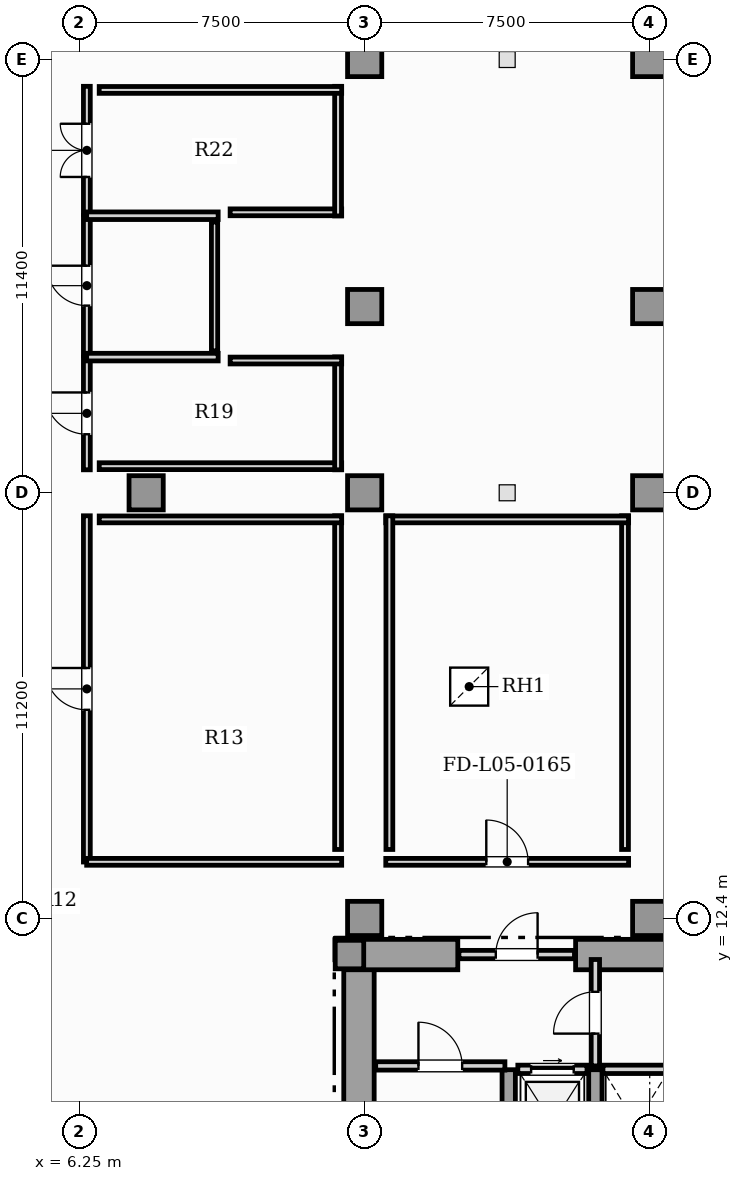
"""IFC4 building model, lengths in metres.
Left out: names, types, materials, properties, quantities, classifications, styles, units other than length and angle.
Written with IfcOpenShell. Run it as: python <this file> out.ifc"""

import sys

from ifc_helpers import new_model, si_unit, direction, frame, frame_2d, origin, origin_2d, place, context, subcontext, project, spatial, rectangle, extrude, element, fill, save


model = new_model("IFC4")
c1 = context("Model", 3, precision=1e-05, world=origin(), true_north=direction((0.0, 1.0)))
c2 = subcontext(c1, "Body", "Model", "MODEL_VIEW")
j1 = project(units=[si_unit("LENGTHUNIT", "METRE"), si_unit("PLANEANGLEUNIT", "RADIAN")], contexts=[c1])
p1 = place(None, origin())
s1 = spatial("IfcSite", under=j1, at=p1, CompositionType="ELEMENT")
p2 = place(p1, origin())
s2 = spatial("IfcBuilding", under=s1, at=p2, CompositionType="ELEMENT")
p3 = place(p2, frame((0.0, 0.0, 24.6)))
s3 = spatial("IfcBuildingStorey", under=s2, at=p3, CompositionType="ELEMENT", Elevation=24.6)
p4 = place(p3, frame((13.6, 0.92, 0.0), z_axis=(0.0, 0.0, 1.0), x_axis=(0.0, 1.0, 0.0)))
e1 = element("IfcWall", 1, at=p4, inside=s3, PredefinedType="SHEAR", context=c2, shape_type="SweptSolid", body=[
    extrude(rectangle(XDim=10.53, YDim=0.8, at=frame_2d((5.265, 0.0))), origin(), (0.0, 0.0, 1.0), 4.95),
])
p5 = place(p3, frame((13.25, 11.45, 0.0), z_axis=(0.0, 0.0, 1.0), x_axis=(1.0, 0.0, 0.0)))
e2 = element("IfcWall", 2, at=p5, inside=s3, PredefinedType="SHEAR", context=c2, shape_type="SweptSolid", body=[
    extrude(rectangle(XDim=2.95, YDim=0.8, at=frame_2d((1.475, 0.0))), origin(), (0.0, 0.0, 1.0), 4.95),
])
p6 = place(p3, frame((19.3, 11.45, 0.0), z_axis=(0.0, 0.0, 1.0), x_axis=(1.0, 0.0, 0.0)))
e3 = element("IfcWall", 3, at=p6, inside=s3, PredefinedType="SHEAR", context=c2, shape_type="SweptSolid", body=[
    extrude(rectangle(XDim=7.3, YDim=0.8, at=frame_2d((3.65, 0.0))), origin(), (0.0, 0.0, 1.0), 4.95),
])
for number, where, z_axis, x_axis in (
    (4, (17.54, 0.92, 0.0), (0.0, 0.0, 1.0), (0.0, 1.0, 0.0)),
    (5, (19.82, 0.92, 0.0), (0.0, 0.0, 1.0), (0.0, 1.0, 0.0)),
):
    element("IfcWall", number, at=place(p3, frame(where, z_axis=z_axis, x_axis=x_axis)), inside=s3, PredefinedType="SHEAR", context=c2, shape_type="SweptSolid", body=[
        extrude(rectangle(XDim=7.5, YDim=0.35, at=frame_2d((3.75, 0.0))), origin(), (0.0, 0.0, 1.0), 4.95),
    ])
p7 = place(p3, frame((13.35, 11.45, 0.0), z_axis=(0.0, 0.0, 1.0), x_axis=(1.0, 0.0, 0.0)))
e6 = element("IfcColumn", 6, at=p7, inside=s3, PredefinedType="COLUMN", context=c2, shape_type="SweptSolid", body=[
    extrude(rectangle(XDim=0.75, YDim=0.75, at=origin_2d()), origin(), (0.0, 0.0, 1.0), 5.2),
])
for number, where, z_axis, x_axis in (
    (7, (13.75, 12.4, 0.0), (0.0, 0.0, 1.0), (1.0, 0.0, 0.0)),
    (8, (13.75, 23.6, 0.0), (0.0, 0.0, 1.0), (1.0, 0.0, 0.0)),
    (9, (13.75, 35.0, 0.0), (0.0, 0.0, 1.0), (1.0, 0.0, 0.0)),
    (10, (21.25, 12.4, 0.0), (0.0, 0.0, 1.0), (1.0, 0.0, 0.0)),
    (11, (8.0, 23.6, 0.0), (0.0, 0.0, 1.0), (1.0, 0.0, 0.0)),
    (12, (21.25, 23.6, 0.0), (0.0, 0.0, 1.0), (1.0, 0.0, 0.0)),
    (13, (13.75, 28.5, 0.0), (0.0, 0.0, 1.0), (1.0, 0.0, 0.0)),
    (14, (21.25, 28.5, 0.0), (0.0, 0.0, 1.0), (1.0, 0.0, 0.0)),
    (15, (21.25, 35.0, 0.0), (0.0, 0.0, 1.0), (1.0, 0.0, 0.0)),
):
    element("IfcColumn", number, at=place(p3, frame(where, z_axis=z_axis, x_axis=x_axis)), inside=s3, PredefinedType="COLUMN", context=c2, shape_type="SweptSolid", body=[
        extrude(rectangle(XDim=0.9, YDim=0.9, at=origin_2d()), origin(), (0.0, 0.0, 1.0), 5.2),
    ])
p8 = place(p3, frame((17.78, 8.43, 0.0), z_axis=(0.0, 0.0, 1.0), x_axis=(1.0, 0.0, 0.0)))
e16 = element("IfcWall", 16, at=p8, inside=s3, PredefinedType="SOLIDWALL", context=c2, shape_type="SweptSolid", body=[
    extrude(rectangle(XDim=1.82, YDim=0.22, at=frame_2d((0.91, 0.0))), origin(), (0.0, 0.0, 1.0), 4.95),
])
p9 = place(p8, frame((0.35, 0.0, 0.0)))
e17 = element("IfcOpeningElement", 17, at=p9, cuts=e16, PredefinedType="OPENING", context=c2, shape_type="SweptSolid", body=[
    extrude(rectangle(XDim=1.12, YDim=2.25, at=frame_2d((0.56, 1.125))), frame((0.0, 0.12, 0.0), z_axis=(0.0, -1.0, 0.0), x_axis=(1.0, 0.0, 0.0)), (0.0, 0.0, 1.0), 0.24),
])
p10 = place(p3, frame((20.02, 8.43, 0.0), z_axis=(0.0, 0.0, 1.0), x_axis=(1.0, 0.0, 0.0)))
e18 = element("IfcWall", 18, at=p10, inside=s3, PredefinedType="SOLIDWALL", context=c2, shape_type="SweptSolid", body=[
    extrude(rectangle(XDim=1.74, YDim=0.22, at=frame_2d((0.87, 0.0))), origin(), (0.0, 0.0, 1.0), 4.95),
])
p11 = place(p3, frame((14.04, 8.52, 0.0), z_axis=(0.0, 0.0, 1.0), x_axis=(1.0, 0.0, 0.0)))
e19 = element("IfcWall", 19, at=p11, inside=s3, PredefinedType="SOLIDWALL", context=c2, shape_type="SweptSolid", body=[
    extrude(rectangle(XDim=3.4, YDim=0.22, at=frame_2d((1.7, 0.0))), origin(), (0.0, 0.0, 1.0), 4.95),
])
p12 = place(p11, frame((1.125, 0.0, 0.0)))
e20 = element("IfcOpeningElement", 20, at=p12, cuts=e19, PredefinedType="OPENING", context=c2, shape_type="SweptSolid", body=[
    extrude(rectangle(XDim=1.15, YDim=2.2, at=frame_2d((0.575, 1.1))), frame((0.0, 0.12, 0.0), z_axis=(0.0, -1.0, 0.0), x_axis=(1.0, 0.0, 0.0)), (0.0, 0.0, 1.0), 0.24),
])
p13 = place(p3, frame((19.82, 8.52, 0.0), z_axis=(0.0, 0.0, 1.0), x_axis=(0.0, 1.0, 0.0)))
e21 = element("IfcWall", 21, at=p13, inside=s3, PredefinedType="SOLIDWALL", context=c2, shape_type="SweptSolid", body=[
    extrude(rectangle(XDim=2.8, YDim=0.22, at=frame_2d((1.4, 0.0))), origin(), (0.0, 0.0, 1.0), 4.406),
])
p14 = place(p13, frame((0.85, 0.0, 0.0)))
e22 = element("IfcOpeningElement", 22, at=p14, cuts=e21, PredefinedType="OPENING", context=c2, shape_type="SweptSolid", body=[
    extrude(rectangle(XDim=1.1, YDim=2.2, at=frame_2d((0.55, 1.1))), frame((0.0, 0.12, 0.0), z_axis=(0.0, -1.0, 0.0), x_axis=(1.0, 0.0, 0.0)), (0.0, 0.0, 1.0), 0.24),
])
p15 = place(p3, frame((16.23, 11.45, 0.0), z_axis=(0.0, 0.0, 1.0), x_axis=(1.0, 0.0, 0.0)))
e23 = element("IfcWall", 23, at=p15, inside=s3, PredefinedType="SOLIDWALL", context=c2, shape_type="SweptSolid", body=[
    extrude(rectangle(XDim=3.04, YDim=0.22, at=frame_2d((1.52, 0.0))), origin(), (0.0, 0.0, 1.0), 4.95),
])
p16 = place(p15, frame((0.97, 0.0, 0.0)))
e24 = element("IfcOpeningElement", 24, at=p16, cuts=e23, PredefinedType="OPENING", context=c2, shape_type="SweptSolid", body=[
    extrude(rectangle(XDim=1.1, YDim=2.2, at=frame_2d((0.55, 1.1))), frame((0.0, 0.12, 0.0), z_axis=(0.0, -1.0, 0.0), x_axis=(1.0, 0.0, 0.0)), (0.0, 0.0, 1.0), 0.24),
])
p17 = place(p3, frame((6.44, 13.885, 0.0), z_axis=(0.0, 0.0, 1.0), x_axis=(0.0, 1.0, 0.0)))
e25 = element("IfcWall", 25, at=p17, inside=s3, PredefinedType="PARTITIONING", context=c2, shape_type="SweptSolid", body=[
    extrude(rectangle(XDim=9.11, YDim=0.18, at=frame_2d((4.555, 0.0))), origin(), (0.0, 0.0, 1.0), 4.95),
])
p18 = place(p17, frame((4.005, 0.0, 0.0)))
e26 = element("IfcOpeningElement", 26, at=p18, cuts=e25, PredefinedType="OPENING", context=c2, shape_type="SweptSolid", body=[
    extrude(rectangle(XDim=1.1, YDim=2.2, at=frame_2d((0.55, 1.1))), frame((0.0, 0.1, 0.0), z_axis=(0.0, -1.0, 0.0), x_axis=(1.0, 0.0, 0.0)), (0.0, 0.0, 1.0), 0.2),
])
p19 = place(p3, frame((6.435, 13.89, 0.0), z_axis=(0.0, 0.0, 1.0), x_axis=(1.0, 0.0, 0.0)))
e27 = element("IfcWall", 27, at=p19, inside=s3, PredefinedType="PARTITIONING", context=c2, shape_type="SweptSolid", body=[
    extrude(rectangle(XDim=6.71, YDim=0.18, at=frame_2d((3.355, 0.0))), origin(), (0.0, 0.0, 1.0), 4.95),
])
p20 = place(p3, frame((14.305, 13.89, 0.0), z_axis=(0.0, 0.0, 1.0), x_axis=(1.0, 0.0, 0.0)))
e28 = element("IfcWall", 28, at=p20, inside=s3, PredefinedType="PARTITIONING", context=c2, shape_type="SweptSolid", body=[
    extrude(rectangle(XDim=6.39, YDim=0.18, at=frame_2d((3.195, 0.0))), origin(), (0.0, 0.0, 1.0), 4.95),
])
p21 = place(p20, frame((2.645, 0.0, 0.0)))
e29 = element("IfcOpeningElement", 29, at=p21, cuts=e28, PredefinedType="OPENING", context=c2, shape_type="SweptSolid", body=[
    extrude(rectangle(XDim=1.1, YDim=2.2, at=frame_2d((0.55, 1.1))), frame((0.0, 0.1, 0.0), z_axis=(0.0, -1.0, 0.0), x_axis=(1.0, 0.0, 0.0)), (0.0, 0.0, 1.0), 0.2),
])
p22 = place(p3, frame((6.44, 24.205, 0.0), z_axis=(0.0, 0.0, 1.0), x_axis=(0.0, 1.0, 0.0)))
e30 = element("IfcWall", 30, at=p22, inside=s3, PredefinedType="PARTITIONING", context=c2, shape_type="SweptSolid", body=[
    extrude(rectangle(XDim=2.97, YDim=0.18, at=frame_2d((1.485, 0.0))), origin(), (0.0, 0.0, 1.0), 4.95),
])
p23 = place(p22, frame((0.935, 0.0, 0.0)))
e31 = element("IfcOpeningElement", 31, at=p23, cuts=e30, PredefinedType="OPENING", context=c2, shape_type="SweptSolid", body=[
    extrude(rectangle(XDim=1.1, YDim=2.2, at=frame_2d((0.55, 1.1))), frame((0.0, 0.1, 0.0), z_axis=(0.0, -1.0, 0.0), x_axis=(1.0, 0.0, 0.0)), (0.0, 0.0, 1.0), 0.2),
])
p24 = place(p3, frame((6.44, 27.205, 0.0), z_axis=(0.0, 0.0, 1.0), x_axis=(0.0, 1.0, 0.0)))
e32 = element("IfcWall", 32, at=p24, inside=s3, PredefinedType="PARTITIONING", context=c2, shape_type="SweptSolid", body=[
    extrude(rectangle(XDim=3.69, YDim=0.18, at=frame_2d((1.845, 0.0))), origin(), (0.0, 0.0, 1.0), 4.95),
])
p25 = place(p24, frame((1.32, 0.0, 0.0)))
e33 = element("IfcOpeningElement", 33, at=p25, cuts=e32, PredefinedType="OPENING", context=c2, shape_type="SweptSolid", body=[
    extrude(rectangle(XDim=1.05, YDim=2.15, at=frame_2d((0.525, 1.075))), frame((0.0, 0.1, 0.0), z_axis=(0.0, -1.0, 0.0), x_axis=(1.0, 0.0, 0.0)), (0.0, 0.0, 1.0), 0.2),
])
p26 = place(p3, frame((6.44, 30.925, 0.0), z_axis=(0.0, 0.0, 1.0), x_axis=(0.0, 1.0, 0.0)))
e34 = element("IfcWall", 34, at=p26, inside=s3, PredefinedType="PARTITIONING", context=c2, shape_type="SweptSolid", body=[
    extrude(rectangle(XDim=3.37, YDim=0.18, at=frame_2d((1.685, 0.0))), origin(), (0.0, 0.0, 1.0), 4.95),
])
p27 = place(p26, frame((0.985, 0.0, 0.0)))
e35 = element("IfcOpeningElement", 35, at=p27, cuts=e34, PredefinedType="OPENING", context=c2, shape_type="SweptSolid", body=[
    extrude(rectangle(XDim=1.4, YDim=2.2, at=frame_2d((0.7, 1.1))), frame((0.0, 0.1, 0.0), z_axis=(0.0, -1.0, 0.0), x_axis=(1.0, 0.0, 0.0)), (0.0, 0.0, 1.0), 0.2),
])
for number, where, z_axis, x_axis in (
    (36, (6.435, 27.17, 0.0), (0.0, 0.0, 1.0), (1.0, 0.0, 0.0)),
    (37, (6.435, 30.89, 0.0), (0.0, 0.0, 1.0), (1.0, 0.0, 0.0)),
):
    element("IfcWall", number, at=place(p3, frame(where, z_axis=z_axis, x_axis=x_axis)), inside=s3, PredefinedType="PARTITIONING", context=c2, shape_type="SweptSolid", body=[
        extrude(rectangle(XDim=3.46, YDim=0.2, at=frame_2d((1.73, 0.0))), origin(), (0.0, 0.0, 1.0), 4.95),
    ])
p28 = place(p3, frame((13.05, 14.215, 0.0), z_axis=(0.0, 0.0, 1.0), x_axis=(0.0, 1.0, 0.0)))
e38 = element("IfcWall", 38, at=p28, inside=s3, PredefinedType="PARTITIONING", context=c2, shape_type="SweptSolid", body=[
    extrude(rectangle(XDim=8.78, YDim=0.18, at=frame_2d((4.39, 0.0))), origin(), (0.0, 0.0, 1.0), 4.95),
])
p29 = place(p3, frame((13.145, 22.9, 0.0), z_axis=(0.0, 0.0, 1.0), x_axis=(-1.0, 0.0, 0.0)))
e39 = element("IfcWall", 39, at=p29, inside=s3, PredefinedType="PARTITIONING", context=c2, shape_type="SweptSolid", body=[
    extrude(rectangle(XDim=6.38, YDim=0.18, at=frame_2d((3.19, 0.0))), origin(), (0.0, 0.0, 1.0), 4.95),
])
p30 = place(p3, frame((20.6, 14.215, 0.0), z_axis=(0.0, 0.0, 1.0), x_axis=(0.0, 1.0, 0.0)))
e40 = element("IfcWall", 40, at=p30, inside=s3, PredefinedType="PARTITIONING", context=c2, shape_type="SweptSolid", body=[
    extrude(rectangle(XDim=8.78, YDim=0.18, at=frame_2d((4.39, 0.0))), origin(), (0.0, 0.0, 1.0), 4.95),
])
p31 = place(p3, frame((20.695, 22.9, 0.0), z_axis=(0.0, 0.0, 1.0), x_axis=(-1.0, 0.0, 0.0)))
e41 = element("IfcWall", 41, at=p31, inside=s3, PredefinedType="PARTITIONING", context=c2, shape_type="SweptSolid", body=[
    extrude(rectangle(XDim=6.39, YDim=0.18, at=frame_2d((3.195, 0.0))), origin(), (0.0, 0.0, 1.0), 4.95),
])
p32 = place(p3, frame((14.4, 22.995, 0.0), z_axis=(0.0, 0.0, 1.0), x_axis=(0.0, -1.0, 0.0)))
e42 = element("IfcWall", 42, at=p32, inside=s3, PredefinedType="PARTITIONING", context=c2, shape_type="SweptSolid", body=[
    extrude(rectangle(XDim=8.78, YDim=0.18, at=frame_2d((4.39, 0.0))), origin(), (0.0, 0.0, 1.0), 4.95),
])
p33 = place(p3, frame((6.765, 24.3, 0.0), z_axis=(0.0, 0.0, 1.0), x_axis=(1.0, 0.0, 0.0)))
e43 = element("IfcWall", 43, at=p33, inside=s3, PredefinedType="PARTITIONING", context=c2, shape_type="SweptSolid", body=[
    extrude(rectangle(XDim=6.38, YDim=0.18, at=frame_2d((3.19, 0.0))), origin(), (0.0, 0.0, 1.0), 4.95),
])
p34 = place(p3, frame((13.05, 24.205, 0.0), z_axis=(0.0, 0.0, 1.0), x_axis=(0.0, 1.0, 0.0)))
e44 = element("IfcWall", 44, at=p34, inside=s3, PredefinedType="PARTITIONING", context=c2, shape_type="SweptSolid", body=[
    extrude(rectangle(XDim=2.97, YDim=0.18, at=frame_2d((1.485, 0.0))), origin(), (0.0, 0.0, 1.0), 4.95),
])
p35 = place(p3, frame((13.145, 27.08, 0.0), z_axis=(0.0, 0.0, 1.0), x_axis=(-1.0, 0.0, 0.0)))
e45 = element("IfcWall", 45, at=p35, inside=s3, PredefinedType="PARTITIONING", context=c2, shape_type="SweptSolid", body=[
    extrude(rectangle(XDim=2.935, YDim=0.18, at=frame_2d((1.468, 0.0))), origin(), (0.0, 0.0, 1.0), 4.95),
])
p36 = place(p3, frame((9.8, 27.335, 0.0), z_axis=(0.0, 0.0, 1.0), x_axis=(0.0, 1.0, 0.0)))
e46 = element("IfcWall", 46, at=p36, inside=s3, PredefinedType="PLUMBINGWALL", context=c2, shape_type="SweptSolid", body=[
    extrude(rectangle(XDim=3.39, YDim=0.165, at=frame_2d((1.695, 0.0))), origin(), (0.0, 0.0, 1.0), 4.95),
])
p37 = place(p3, frame((10.21, 30.98, 0.0), z_axis=(0.0, 0.0, 1.0), x_axis=(1.0, 0.0, 0.0)))
e47 = element("IfcWall", 47, at=p37, inside=s3, PredefinedType="PARTITIONING", context=c2, shape_type="SweptSolid", body=[
    extrude(rectangle(XDim=2.935, YDim=0.18, at=frame_2d((1.468, 0.0))), origin(), (0.0, 0.0, 1.0), 4.95),
])
p38 = place(p3, frame((13.05, 30.885, 0.0), z_axis=(0.0, 0.0, 1.0), x_axis=(0.0, 1.0, 0.0)))
e48 = element("IfcWall", 48, at=p38, inside=s3, PredefinedType="PARTITIONING", context=c2, shape_type="SweptSolid", body=[
    extrude(rectangle(XDim=3.41, YDim=0.18, at=frame_2d((1.705, 0.0))), origin(), (0.0, 0.0, 1.0), 4.95),
])
p39 = place(p3, frame((13.145, 34.2, 0.0), z_axis=(0.0, 0.0, 1.0), x_axis=(-1.0, 0.0, 0.0)))
e49 = element("IfcWall", 49, at=p39, inside=s3, PredefinedType="PARTITIONING", context=c2, shape_type="SweptSolid", body=[
    extrude(rectangle(XDim=6.38, YDim=0.18, at=frame_2d((3.19, 0.0))), origin(), (0.0, 0.0, 1.0), 4.95),
])
p40 = place(p3, frame((0.0, 0.0, -0.4)))
p41 = place(p40, frame((16.5, 18.5, 0.35)))
e50 = element("IfcDoor", 50, at=p41, inside=s3, OperationType="SINGLE_SWING_LEFT", PredefinedType="TRAPDOOR", context=c2, shape_type="SweptSolid", body=[
    extrude(rectangle(XDim=1.0, YDim=1.0, at=origin_2d()), origin(), (0.0, 0.0, 1.0), 0.05),
])
p42 = place(p9, origin())
e51 = element("IfcDoor", 51, at=p42, inside=s3, OperationType="SLIDING_TO_RIGHT", PredefinedType="DOOR", context=c2, shape_type="SweptSolid", body=[
    extrude(rectangle(XDim=1.12, YDim=2.25, at=frame_2d((0.56, 1.125))), frame((0.0, 0.025, 0.0), z_axis=(0.0, -1.0, 0.0), x_axis=(1.0, 0.0, 0.0)), (0.0, 0.0, 1.0), 0.05),
])
fill(e17, e51)
p43 = place(p12, origin())
e52 = element("IfcDoor", 52, at=p43, inside=s3, OperationType="SINGLE_SWING_LEFT", PredefinedType="DOOR", context=c2, shape_type="SweptSolid", body=[
    extrude(rectangle(XDim=1.15, YDim=2.2, at=frame_2d((0.575, 1.1))), frame((0.0, 0.025, 0.0), z_axis=(0.0, -1.0, 0.0), x_axis=(1.0, 0.0, 0.0)), (0.0, 0.0, 1.0), 0.05),
])
fill(e20, e52)
p44 = place(p14, origin())
e53 = element("IfcDoor", 53, at=p44, inside=s3, OperationType="SINGLE_SWING_LEFT", PredefinedType="DOOR", context=c2, shape_type="SweptSolid", body=[
    extrude(rectangle(XDim=1.1, YDim=2.2, at=frame_2d((0.55, 1.1))), frame((0.0, 0.025, 0.0), z_axis=(0.0, -1.0, 0.0), x_axis=(1.0, 0.0, 0.0)), (0.0, 0.0, 1.0), 0.05),
])
fill(e22, e53)
p45 = place(p16, origin())
e54 = element("IfcDoor", 54, at=p45, inside=s3, OperationType="SINGLE_SWING_RIGHT", PredefinedType="DOOR", context=c2, shape_type="SweptSolid", body=[
    extrude(rectangle(XDim=1.1, YDim=2.2, at=frame_2d((0.55, 1.1))), frame((0.0, 0.025, 0.0), z_axis=(0.0, -1.0, 0.0), x_axis=(1.0, 0.0, 0.0)), (0.0, 0.0, 1.0), 0.05),
])
fill(e24, e54)
p46 = place(p18, origin())
e55 = element("IfcDoor", 55, at=p46, inside=s3, OperationType="SINGLE_SWING_RIGHT", PredefinedType="DOOR", context=c2, shape_type="SweptSolid", body=[
    extrude(rectangle(XDim=1.1, YDim=2.2, at=frame_2d((0.55, 1.1))), frame((0.0, 0.025, 0.0), z_axis=(0.0, -1.0, 0.0), x_axis=(1.0, 0.0, 0.0)), (0.0, 0.0, 1.0), 0.05),
])
fill(e26, e55)
p47 = place(p21, origin())
e56 = element("IfcDoor", 56, at=p47, inside=s3, OperationType="SINGLE_SWING_LEFT", PredefinedType="DOOR", context=c2, shape_type="SweptSolid", body=[
    extrude(rectangle(XDim=1.1, YDim=2.2, at=frame_2d((0.55, 1.1))), frame((0.0, 0.025, 0.0), z_axis=(0.0, -1.0, 0.0), x_axis=(1.0, 0.0, 0.0)), (0.0, 0.0, 1.0), 0.05),
])
fill(e29, e56)
p48 = place(p23, origin())
e57 = element("IfcDoor", 57, at=p48, inside=s3, OperationType="SINGLE_SWING_RIGHT", PredefinedType="DOOR", context=c2, shape_type="SweptSolid", body=[
    extrude(rectangle(XDim=1.1, YDim=2.2, at=frame_2d((0.55, 1.1))), frame((0.0, 0.025, 0.0), z_axis=(0.0, -1.0, 0.0), x_axis=(1.0, 0.0, 0.0)), (0.0, 0.0, 1.0), 0.05),
])
fill(e31, e57)
p49 = place(p25, origin())
e58 = element("IfcDoor", 58, at=p49, inside=s3, OperationType="SINGLE_SWING_RIGHT", PredefinedType="DOOR", context=c2, shape_type="SweptSolid", body=[
    extrude(rectangle(XDim=1.05, YDim=2.15, at=frame_2d((0.525, 1.075))), frame((0.0, 0.025, 0.0), z_axis=(0.0, -1.0, 0.0), x_axis=(1.0, 0.0, 0.0)), (0.0, 0.0, 1.0), 0.05),
])
fill(e33, e58)
p50 = place(p27, origin())
e59 = element("IfcDoor", 59, at=p50, inside=s3, OperationType="DOUBLE_DOOR_SINGLE_SWING", PredefinedType="DOOR", context=c2, shape_type="SweptSolid", body=[
    extrude(rectangle(XDim=1.4, YDim=2.2, at=frame_2d((0.7, 1.1))), frame((0.0, 0.025, 0.0), z_axis=(0.0, -1.0, 0.0), x_axis=(1.0, 0.0, 0.0)), (0.0, 0.0, 1.0), 0.05),
])
fill(e35, e59)
save(model, sys.argv[1])
